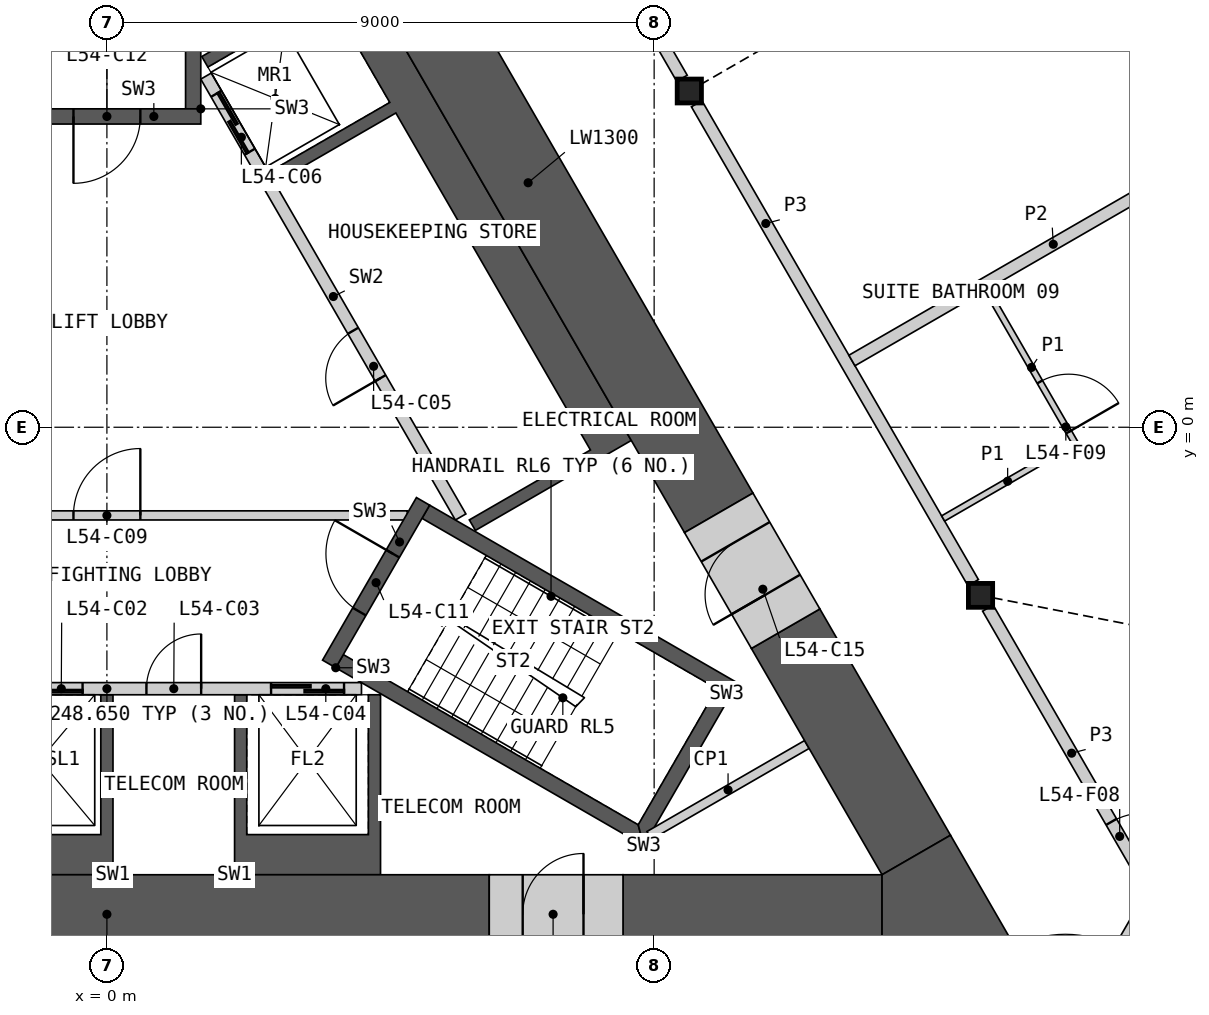
"""IFC4 building model, lengths in metres.
Left out: names, types, materials, properties, quantities, classifications, styles, units other than length and angle.
Written with IfcOpenShell. Run it as: python <this file> out.ifc"""

import sys

from ifc_helpers import new_model, si_unit, direction, frame, frame_2d, origin, origin_2d, place, context, subcontext, project, spatial, polyline, rectangle, i_section, outline, extrude, element, fill, save


model = new_model("IFC4")
c1 = context("Model", 3, precision=1e-05, world=origin(), true_north=direction((0.0, 1.0)))
c2 = subcontext(c1, "Body", "Model", "MODEL_VIEW")
j1 = project(units=[si_unit("LENGTHUNIT", "METRE"), si_unit("PLANEANGLEUNIT", "RADIAN")], contexts=[c1])
p1 = place(None, origin())
s1 = spatial("IfcSite", under=j1, at=p1, CompositionType="ELEMENT")
p2 = place(p1, origin())
s2 = spatial("IfcBuilding", under=s1, at=p2, CompositionType="ELEMENT")
p3 = place(p2, frame((0.0, 0.0, 245.4)))
s3 = spatial("IfcBuildingStorey", under=s2, at=p3, CompositionType="ELEMENT", Elevation=245.4)
for number, where, z_axis, x_axis in (
    (1, (14.368, -2.765, 0.0), (0.0, 0.0, 1.0), (1.0, 0.0, 0.0)),
    (2, (9.578, 5.53, 0.0), (0.0, 0.0, 1.0), (1.0, 0.0, 0.0)),
):
    element("IfcColumn", number, at=place(p3, frame(where, z_axis=z_axis, x_axis=x_axis)), inside=s3, PredefinedType="COLUMN", context=c2, shape_type="SweptSolid", body=[
        extrude(i_section(OverallWidth=0.399, OverallDepth=0.393, WebThickness=0.023, FlangeThickness=0.037, at=origin_2d()), origin(), (0.0, 0.0, 1.0), 3.6),
    ])
p4 = place(p3, origin())
e3 = element("IfcWall", 3, at=p4, inside=s3, PredefinedType="SHEAR", context=c2, shape_type="SweptSolid", body=[
    extrude(outline(polyline([(0.1, -7.36), (-4.5, -7.36), (-4.5, -4.4), (-4.3, -4.4), (-4.3, -6.7), (-2.3, -6.7), (-2.3, -4.4), (-2.1, -4.4), (-2.1, -6.7), (-0.1, -6.7), (-0.1, -4.4), (0.1, -4.4), (0.1, -7.36)])), origin(), (0.0, 0.0, 1.0), 3.25),
])
p5 = place(p3, origin())
e4 = element("IfcWall", 4, at=p5, inside=s3, PredefinedType="SHEAR", context=c2, shape_type="SweptSolid", body=[
    extrude(outline(polyline([(2.1, -7.36), (2.1, -4.4), (2.3, -4.4), (2.3, -6.7), (4.3, -6.7), (4.3, -4.4), (4.5, -4.4), (4.5, -7.36), (2.1, -7.36)])), origin(), (0.0, 0.0, 1.0), 3.25),
])
p6 = place(p3, frame((-4.187, -4.3, 0.0), z_axis=(0.0, 0.0, 1.0), x_axis=(1.0, 0.0, 0.0)))
e5 = element("IfcWall", 5, at=p6, inside=s3, PredefinedType="SOLIDWALL", context=c2, shape_type="SweptSolid", body=[
    extrude(rectangle(XDim=8.373, YDim=0.2, at=frame_2d((4.187, 0.0))), origin(), (0.0, 0.0, 1.0), 3.25),
])
p7 = place(p6, frame((0.287, 0.0, 0.0)))
e6 = element("IfcOpeningElement", 6, at=p7, cuts=e5, PredefinedType="OPENING", context=c2, shape_type="SweptSolid", body=[
    extrude(rectangle(XDim=1.2, YDim=2.1, at=frame_2d((0.6, 1.05))), frame((0.0, 0.11, 0.0), z_axis=(0.0, -1.0, 0.0), x_axis=(1.0, 0.0, 0.0)), (0.0, 0.0, 1.0), 0.22),
])
p8 = place(p6, frame((2.387, 0.0, 0.0)))
e7 = element("IfcOpeningElement", 7, at=p8, cuts=e5, PredefinedType="OPENING", context=c2, shape_type="SweptSolid", body=[
    extrude(rectangle(XDim=1.4, YDim=2.1, at=frame_2d((0.7, 1.05))), frame((0.0, 0.11, 0.0), z_axis=(0.0, -1.0, 0.0), x_axis=(1.0, 0.0, 0.0)), (0.0, 0.0, 1.0), 0.22),
])
p9 = place(p6, frame((4.837, 0.0, 0.0)))
e8 = element("IfcOpeningElement", 8, at=p9, cuts=e5, PredefinedType="OPENING", context=c2, shape_type="SweptSolid", body=[
    extrude(rectangle(XDim=0.9, YDim=2.1, at=frame_2d((0.45, 1.05))), frame((0.0, 0.11, 0.0), z_axis=(0.0, -1.0, 0.0), x_axis=(1.0, 0.0, 0.0)), (0.0, 0.0, 1.0), 0.22),
])
p10 = place(p6, frame((6.887, 0.0, 0.0)))
e9 = element("IfcOpeningElement", 9, at=p10, cuts=e5, PredefinedType="OPENING", context=c2, shape_type="SweptSolid", body=[
    extrude(rectangle(XDim=1.2, YDim=2.1, at=frame_2d((0.6, 1.05))), frame((0.0, 0.11, 0.0), z_axis=(0.0, -1.0, 0.0), x_axis=(1.0, 0.0, 0.0)), (0.0, 0.0, 1.0), 0.22),
])
p11 = place(p3, origin())
e10 = element("IfcWall", 10, at=p11, inside=s3, PredefinedType="SHEAR", context=c2, shape_type="SweptSolid", body=[
    extrude(outline(polyline([(4.124, 7.577), (8.624, -0.217), (8.231, -0.444), (6.061, -1.697), (5.96, -1.524), (7.952, -0.374), (4.752, 5.169), (2.76, 4.019), (2.66, 4.192), (4.652, 5.342), (3.652, 7.074), (1.66, 5.924), (1.561, 6.097), (3.731, 7.35), (4.124, 7.577)])), origin(), (0.0, 0.0, 1.0), 3.25),
])
p12 = place(p3, frame((5.817, -1.476, 0.0), z_axis=(0.0, 0.0, 1.0), x_axis=(-0.500002616675, 0.866023893041, 0.0)))
e11 = element("IfcWall", 11, at=p12, inside=s3, PredefinedType="SOLIDWALL", context=c2, shape_type="SweptSolid", body=[
    extrude(rectangle(XDim=8.373, YDim=0.2, at=frame_2d((4.187, 0.0))), origin(), (0.0, 0.0, 1.0), 3.25),
])
p13 = place(p12, frame((2.637, 0.0, 0.0)))
e12 = element("IfcOpeningElement", 12, at=p13, cuts=e11, PredefinedType="OPENING", context=c2, shape_type="SweptSolid", body=[
    extrude(rectangle(XDim=0.9, YDim=2.1, at=frame_2d((0.45, 1.05))), frame((0.0, 0.11, 0.0), z_axis=(0.0, -1.0, 0.0), x_axis=(1.0, 0.0, 0.0)), (0.0, 0.0, 1.0), 0.22),
])
p14 = place(p12, frame((6.937, 0.0, 0.0)))
e13 = element("IfcOpeningElement", 13, at=p14, cuts=e11, PredefinedType="OPENING", context=c2, shape_type="SweptSolid", body=[
    extrude(rectangle(XDim=1.1, YDim=2.1, at=frame_2d((0.55, 1.05))), frame((0.0, 0.11, 0.0), z_axis=(0.0, -1.0, 0.0), x_axis=(1.0, 0.0, 0.0)), (0.0, 0.0, 1.0), 0.22),
])
p15 = place(p3, frame((-4.941, -1.45, 0.0), z_axis=(0.0, 0.0, 1.0), x_axis=(1.0, 0.0, 0.0)))
e14 = element("IfcWall", 14, at=p15, inside=s3, PredefinedType="PARTITIONING", context=c2, shape_type="SweptSolid", body=[
    extrude(rectangle(XDim=9.882, YDim=0.15, at=frame_2d((4.941, 0.0))), origin(), (0.0, 0.0, 1.0), 3.25),
])
p16 = place(p15, frame((4.391, 0.0, 0.0)))
e15 = element("IfcOpeningElement", 15, at=p16, cuts=e14, PredefinedType="OPENING", context=c2, shape_type="SweptSolid", body=[
    extrude(rectangle(XDim=1.1, YDim=2.1, at=frame_2d((0.55, 1.05))), frame((0.0, 0.085, 0.0), z_axis=(0.0, -1.0, 0.0), x_axis=(1.0, 0.0, 0.0)), (0.0, 0.0, 1.0), 0.17),
])
p17 = place(p3, origin())
e16 = element("IfcWall", 16, at=p17, inside=s3, PredefinedType="SHEAR", context=c2, shape_type="SweptSolid", body=[
    extrude(outline(polyline([(3.763, -3.956), (8.83, -6.881), (8.738, -6.539), (3.888, -3.739), (3.763, -3.956)])), origin(), (0.0, 0.0, 1.0), 3.25),
])
p18 = place(p3, origin())
e17 = element("IfcWall", 17, at=p18, inside=s3, PredefinedType="SHEAR", context=c2, shape_type="SweptSolid", body=[
    extrude(outline(polyline([(8.83, -6.881), (10.374, -4.206), (10.032, -4.298), (8.738, -6.539), (8.83, -6.881)])), origin(), (0.0, 0.0, 1.0), 3.25),
])
p19 = place(p3, origin())
e18 = element("IfcWall", 18, at=p19, inside=s3, PredefinedType="SHEAR", context=c2, shape_type="SweptSolid", body=[
    extrude(outline(polyline([(10.032, -4.298), (10.374, -4.206), (5.307, -1.281), (5.182, -1.498), (10.032, -4.298)])), origin(), (0.0, 0.0, 1.0), 3.25),
])
p20 = place(p3, frame((3.655, -3.893, 0.0), z_axis=(0.0, 0.0, 1.0), x_axis=(0.499982516597, 0.866035497597, 0.0)))
e19 = element("IfcWall", 19, at=p20, inside=s3, PredefinedType="SHEAR", context=c2, shape_type="SweptSolid", body=[
    extrude(rectangle(XDim=3.088, YDim=0.25, at=frame_2d((1.544, 0.0))), origin(), (0.0, 0.0, 1.0), 3.25),
])
p21 = place(p20, frame((0.994, 0.0, 0.0)))
e20 = element("IfcOpeningElement", 20, at=p21, cuts=e19, PredefinedType="OPENING", context=c2, shape_type="SweptSolid", body=[
    extrude(rectangle(XDim=1.1, YDim=2.1, at=frame_2d((0.55, 1.05))), frame((0.0, 0.135, 0.0), z_axis=(0.0, -1.0, 0.0), x_axis=(1.0, 0.0, 0.0)), (0.0, 0.0, 1.0), 0.27),
])
p22 = place(p3, origin())
e21 = element("IfcWall", 21, at=p22, inside=s3, PredefinedType="SHEAR", context=c2, shape_type="SweptSolid", body=[
    extrude(outline(polyline([(1.544, 5.237), (1.544, 11.087), (1.294, 10.837), (1.294, 5.237), (1.544, 5.237)])), origin(), (0.0, 0.0, 1.0), 3.25),
])
p23 = place(p3, frame((1.544, 5.112, 0.0), z_axis=(0.0, 0.0, 1.0), x_axis=(-1.0, 0.0, 0.0)))
e22 = element("IfcWall", 22, at=p23, inside=s3, PredefinedType="SHEAR", context=c2, shape_type="SweptSolid", body=[
    extrude(rectangle(XDim=3.088, YDim=0.25, at=frame_2d((1.544, 0.0))), origin(), (0.0, 0.0, 1.0), 3.25),
])
p24 = place(p23, frame((0.994, 0.0, 0.0)))
e23 = element("IfcOpeningElement", 23, at=p24, cuts=e22, PredefinedType="OPENING", context=c2, shape_type="SweptSolid", body=[
    extrude(rectangle(XDim=1.1, YDim=2.1, at=frame_2d((0.55, 1.05))), frame((0.0, 0.135, 0.0), z_axis=(0.0, -1.0, 0.0), x_axis=(1.0, 0.0, 0.0)), (0.0, 0.0, 1.0), 0.27),
])
p25 = place(p3, frame((11.511, -5.218, 0.0), z_axis=(0.0, 0.0, 1.0), x_axis=(-0.866045649925, -0.499964931016, 0.0)))
e24 = element("IfcWall", 24, at=p25, inside=s3, PredefinedType="PARTITIONING", context=c2, shape_type="SweptSolid", body=[
    extrude(rectangle(XDim=2.992, YDim=0.15, at=frame_2d((1.496, 0.0))), origin(), (0.0, 0.0, 1.0), 3.25),
])
p26 = place(p3, frame((-6.288, -8.01, 0.0), z_axis=(0.0, 0.0, 1.0), x_axis=(1.0, 0.0, 0.0)))
e25 = element("IfcWall", 25, at=p26, inside=s3, PredefinedType="SHEAR", context=c2, shape_type="SweptSolid", body=[
    extrude(rectangle(XDim=12.576, YDim=1.3, at=frame_2d((6.288, 0.0))), origin(), (0.0, 0.0, 1.0), 3.25),
])
p27 = place(p3, frame((8.488, -8.01, 0.0), z_axis=(0.0, 0.0, 1.0), x_axis=(1.0, 0.0, 0.0)))
e26 = element("IfcWall", 26, at=p27, inside=s3, PredefinedType="SHEAR", context=c2, shape_type="SweptSolid", body=[
    extrude(rectangle(XDim=4.26, YDim=1.3, at=frame_2d((2.13, 0.0))), origin(), (0.0, 0.0, 1.0), 3.25),
])
p28 = place(p3, frame((10.062, -1.408, 0.0), z_axis=(0.0, 0.0, 1.0), x_axis=(-0.500000545805, 0.866025088663, 0.0)))
e27 = element("IfcWall", 27, at=p28, inside=s3, PredefinedType="SHEAR", context=c2, shape_type="SweptSolid", body=[
    extrude(rectangle(XDim=12.539, YDim=1.3, at=frame_2d((6.27, 0.0))), origin(), (0.0, 0.0, 1.0), 3.25),
])
p29 = place(p3, frame((13.311, -7.035, 0.0), z_axis=(0.0, 0.0, 1.0), x_axis=(-0.500012574659, 0.86601814368, 0.0)))
e28 = element("IfcWall", 28, at=p29, inside=s3, PredefinedType="SHEAR", context=c2, shape_type="SweptSolid", body=[
    extrude(rectangle(XDim=4.298, YDim=1.3, at=frame_2d((2.149, 0.0))), origin(), (0.0, 0.0, 1.0), 3.25),
])
p30 = place(p3, origin())
e29 = element("IfcWall", 29, at=p30, inside=s3, PredefinedType="SHEAR", context=c2, shape_type="SweptSolid", body=[
    extrude(outline(polyline([(12.748, -8.66), (12.748, -7.36), (13.874, -6.71), (15.0, -8.66), (12.748, -8.66)])), origin(), (0.0, 0.0, 1.0), 3.25),
])
p31 = place(p3, frame((6.288, -8.01, 0.0), z_axis=(0.0, 0.0, 1.0), x_axis=(1.0, 0.0, 0.0)))
e30 = element("IfcWall", 30, at=p31, inside=s3, PredefinedType="SHEAR", context=c2, shape_type="SweptSolid", body=[
    extrude(rectangle(XDim=2.2, YDim=1.3, at=frame_2d((1.1, 0.0))), origin(), (0.0, 0.0, 1.0), 3.25),
])
p32 = place(p31, frame((0.55, 0.0, 0.0)))
e31 = element("IfcOpeningElement", 31, at=p32, cuts=e30, PredefinedType="OPENING", context=c2, shape_type="SweptSolid", body=[
    extrude(rectangle(XDim=1.0, YDim=2.1, at=frame_2d((0.5, 1.05))), frame((0.0, 0.66, 0.0), z_axis=(0.0, -1.0, 0.0), x_axis=(1.0, 0.0, 0.0)), (0.0, 0.0, 1.0), 1.32),
])
p33 = place(p3, frame((11.163, -3.313, 0.0), z_axis=(0.0, 0.0, 1.0), x_axis=(-0.50002983664, 0.866008176907, 0.0)))
e32 = element("IfcWall", 32, at=p33, inside=s3, PredefinedType="SHEAR", context=c2, shape_type="SweptSolid", body=[
    extrude(rectangle(XDim=2.2, YDim=1.3, at=frame_2d((1.1, 0.0))), origin(), (0.0, 0.0, 1.0), 3.25),
])
p34 = place(p33, frame((0.65, 0.0, 0.0)))
e33 = element("IfcOpeningElement", 33, at=p34, cuts=e32, PredefinedType="OPENING", context=c2, shape_type="SweptSolid", body=[
    extrude(rectangle(XDim=1.0, YDim=2.1, at=frame_2d((0.5, 1.05))), frame((0.0, 0.66, 0.0), z_axis=(0.0, -1.0, 0.0), x_axis=(1.0, 0.0, 0.0)), (0.0, 0.0, 1.0), 1.32),
])
p35 = place(p3, frame((9.699, 5.321, 0.0), z_axis=(0.0, 0.0, 1.0), x_axis=(0.49998193945, -0.866035830797, 0.0)))
e34 = element("IfcWall", 34, at=p35, inside=s3, PredefinedType="PARTITIONING", context=c2, shape_type="SweptSolid", body=[
    extrude(rectangle(XDim=9.094, YDim=0.2, at=frame_2d((4.547, 0.0))), origin(), (0.0, 0.0, 1.0), 3.25),
])
p36 = place(p3, frame((4.91, 13.616, 0.0), z_axis=(0.0, 0.0, 1.0), x_axis=(0.50000207303, -0.866024206917, 0.0)))
e35 = element("IfcWall", 35, at=p36, inside=s3, PredefinedType="PARTITIONING", context=c2, shape_type="SweptSolid", body=[
    extrude(rectangle(XDim=9.095, YDim=0.2, at=frame_2d((4.547, 0.0))), origin(), (0.0, 0.0, 1.0), 3.25),
])
p37 = place(p36, frame((5.726, 0.0, 0.0)))
e36 = element("IfcOpeningElement", 36, at=p37, cuts=e35, PredefinedType="OPENING", context=c2, shape_type="SweptSolid", body=[
    extrude(rectangle(XDim=1.8, YDim=2.1, at=frame_2d((0.9, 1.05))), frame((0.0, 0.11, 0.0), z_axis=(0.0, -1.0, 0.0), x_axis=(1.0, 0.0, 0.0)), (0.0, 0.0, 1.0), 0.22),
])
p38 = place(p3, frame((14.489, -2.975, 0.0), z_axis=(0.0, 0.0, 1.0), x_axis=(0.500017753321, -0.866015153657, 0.0)))
e37 = element("IfcWall", 37, at=p38, inside=s3, PredefinedType="PARTITIONING", context=c2, shape_type="SweptSolid", body=[
    extrude(rectangle(XDim=5.51, YDim=0.2, at=frame_2d((2.755, 0.0))), origin(), (0.0, 0.0, 1.0), 3.25),
])
p39 = place(p38, frame((4.06, 0.0, 0.0)))
e38 = element("IfcOpeningElement", 38, at=p39, cuts=e37, PredefinedType="OPENING", context=c2, shape_type="SweptSolid", body=[
    extrude(rectangle(XDim=1.1, YDim=2.1, at=frame_2d((0.55, 1.05))), frame((0.0, 0.11, 0.0), z_axis=(0.0, -1.0, 0.0), x_axis=(1.0, 0.0, 0.0)), (0.0, 0.0, 1.0), 0.22),
])
p40 = place(p3, frame((15.231, -11.06, 0.0), z_axis=(0.0, 0.0, 1.0), x_axis=(0.499961815444, 0.866047448526, 0.0)))
e39 = element("IfcWall", 39, at=p40, inside=s3, PredefinedType="PARTITIONING", context=c2, shape_type="SweptSolid", body=[
    extrude(rectangle(XDim=3.826, YDim=0.2, at=frame_2d((1.913, 0.0))), origin(), (0.0, 0.0, 1.0), 3.25),
])
p41 = place(p40, frame((1.064, 0.0, 0.0)))
e40 = element("IfcOpeningElement", 40, at=p41, cuts=e39, PredefinedType="OPENING", context=c2, shape_type="SweptSolid", body=[
    extrude(rectangle(XDim=1.8, YDim=2.1, at=frame_2d((0.9, 1.05))), frame((0.0, 0.11, 0.0), z_axis=(0.0, -1.0, 0.0), x_axis=(1.0, 0.0, 0.0)), (0.0, 0.0, 1.0), 0.22),
])
p42 = place(p3, frame((12.253, 1.098, 0.0), z_axis=(0.0, 0.0, 1.0), x_axis=(0.866026077102, 0.499998833779, 0.0)))
e41 = element("IfcWall", 41, at=p42, inside=s3, PredefinedType="PARTITIONING", context=c2, shape_type="SweptSolid", body=[
    extrude(rectangle(XDim=7.646, YDim=0.2, at=frame_2d((3.823, 0.0))), origin(), (0.0, 0.0, 1.0), 2.404),
])
p43 = place(p3, frame((14.468, 2.261, 0.0), z_axis=(0.0, 0.0, 1.0), x_axis=(0.500037662692, -0.866003658127, 0.0)))
e42 = element("IfcWall", 42, at=p43, inside=s3, PredefinedType="PARTITIONING", context=c2, shape_type="SweptSolid", body=[
    extrude(rectangle(XDim=2.95, YDim=0.1, at=frame_2d((1.475, 0.0))), origin(), (0.0, 0.0, 1.0), 2.404),
])
p44 = place(p43, frame((1.75, 0.0, 0.0)))
e43 = element("IfcOpeningElement", 43, at=p44, cuts=e42, PredefinedType="OPENING", context=c2, shape_type="SweptSolid", body=[
    extrude(rectangle(XDim=0.95, YDim=2.1, at=frame_2d((0.475, 1.05))), frame((0.0, 0.06, 0.0), z_axis=(0.0, -1.0, 0.0), x_axis=(1.0, 0.0, 0.0)), (0.0, 0.0, 1.0), 0.12),
])
p45 = place(p3, frame((13.753, -1.5, 0.0), z_axis=(0.0, 0.0, 1.0), x_axis=(0.866014668023, 0.500018594424, 0.0)))
e44 = element("IfcWall", 44, at=p45, inside=s3, PredefinedType="PARTITIONING", context=c2, shape_type="SweptSolid", body=[
    extrude(rectangle(XDim=2.45, YDim=0.1, at=frame_2d((1.225, 0.0))), origin(), (0.0, 0.0, 1.0), 2.404),
])
p46 = place(p8, origin())
e45 = element("IfcDoor", 45, at=p46, inside=s3, OperationType="SLIDING_TO_LEFT", PredefinedType="DOOR", context=c2, shape_type="SweptSolid", body=[
    extrude(rectangle(XDim=1.4, YDim=2.1, at=frame_2d((0.7, 1.05))), frame((0.0, 0.025, 0.0), z_axis=(0.0, -1.0, 0.0), x_axis=(1.0, 0.0, 0.0)), (0.0, 0.0, 1.0), 0.05),
])
fill(e7, e45)
p47 = place(p9, origin())
e46 = element("IfcDoor", 46, at=p47, inside=s3, OperationType="SINGLE_SWING_RIGHT", PredefinedType="DOOR", context=c2, shape_type="SweptSolid", body=[
    extrude(rectangle(XDim=0.9, YDim=2.1, at=frame_2d((0.45, 1.05))), frame((0.0, 0.025, 0.0), z_axis=(0.0, -1.0, 0.0), x_axis=(1.0, 0.0, 0.0)), (0.0, 0.0, 1.0), 0.05),
])
fill(e8, e46)
p48 = place(p10, origin())
e47 = element("IfcDoor", 47, at=p48, inside=s3, OperationType="SLIDING_TO_LEFT", PredefinedType="DOOR", context=c2, shape_type="SweptSolid", body=[
    extrude(rectangle(XDim=1.2, YDim=2.1, at=frame_2d((0.6, 1.05))), frame((0.0, 0.025, 0.0), z_axis=(0.0, -1.0, 0.0), x_axis=(1.0, 0.0, 0.0)), (0.0, 0.0, 1.0), 0.05),
])
fill(e9, e47)
p49 = place(p13, origin())
e48 = element("IfcDoor", 48, at=p49, inside=s3, OperationType="SINGLE_SWING_LEFT", PredefinedType="DOOR", context=c2, shape_type="SweptSolid", body=[
    extrude(rectangle(XDim=0.9, YDim=2.1, at=frame_2d((0.45, 1.05))), frame((0.0, 0.025, 0.0), z_axis=(0.0, -1.0, 0.0), x_axis=(1.0, 0.0, 0.0)), (0.0, 0.0, 1.0), 0.05),
])
fill(e12, e48)
p50 = place(p14, origin())
e49 = element("IfcDoor", 49, at=p50, inside=s3, OperationType="SLIDING_TO_LEFT", PredefinedType="DOOR", context=c2, shape_type="SweptSolid", body=[
    extrude(rectangle(XDim=1.1, YDim=2.1, at=frame_2d((0.55, 1.05))), frame((0.0, 0.025, 0.0), z_axis=(0.0, -1.0, 0.0), x_axis=(1.0, 0.0, 0.0)), (0.0, 0.0, 1.0), 0.05),
])
fill(e13, e49)
p51 = place(p16, origin())
e50 = element("IfcDoor", 50, at=p51, inside=s3, OperationType="SINGLE_SWING_RIGHT", PredefinedType="DOOR", context=c2, shape_type="SweptSolid", body=[
    extrude(rectangle(XDim=1.1, YDim=2.1, at=frame_2d((0.55, 1.05))), frame((0.0, 0.025, 0.0), z_axis=(0.0, -1.0, 0.0), x_axis=(1.0, 0.0, 0.0)), (0.0, 0.0, 1.0), 0.05),
])
fill(e15, e50)
p52 = place(p21, origin())
e51 = element("IfcDoor", 51, at=p52, inside=s3, OperationType="SINGLE_SWING_RIGHT", PredefinedType="DOOR", context=c2, shape_type="SweptSolid", body=[
    extrude(rectangle(XDim=1.1, YDim=2.1, at=frame_2d((0.55, 1.05))), frame((0.0, 0.025, 0.0), z_axis=(0.0, -1.0, 0.0), x_axis=(1.0, 0.0, 0.0)), (0.0, 0.0, 1.0), 0.05),
])
fill(e20, e51)
p53 = place(p24, origin())
e52 = element("IfcDoor", 52, at=p53, inside=s3, OperationType="SINGLE_SWING_RIGHT", PredefinedType="DOOR", context=c2, shape_type="SweptSolid", body=[
    extrude(rectangle(XDim=1.1, YDim=2.1, at=frame_2d((0.55, 1.05))), frame((0.0, 0.025, 0.0), z_axis=(0.0, -1.0, 0.0), x_axis=(1.0, 0.0, 0.0)), (0.0, 0.0, 1.0), 0.05),
])
fill(e23, e52)
p54 = place(p32, origin())
e53 = element("IfcDoor", 53, at=p54, inside=s3, OperationType="SINGLE_SWING_RIGHT", PredefinedType="DOOR", context=c2, shape_type="SweptSolid", body=[
    extrude(rectangle(XDim=1.0, YDim=2.1, at=frame_2d((0.5, 1.05))), frame((0.0, 0.405, 0.0), z_axis=(0.0, -1.0, 0.0), x_axis=(1.0, 0.0, 0.0)), (0.0, 0.0, 1.0), 0.05),
])
fill(e31, e53)
p55 = place(p34, origin())
e54 = element("IfcDoor", 54, at=p55, inside=s3, OperationType="SINGLE_SWING_LEFT", PredefinedType="DOOR", context=c2, shape_type="SweptSolid", body=[
    extrude(rectangle(XDim=1.0, YDim=2.1, at=frame_2d((0.5, 1.05))), frame((0.0, 0.405, 0.0), z_axis=(0.0, -1.0, 0.0), x_axis=(1.0, 0.0, 0.0)), (0.0, 0.0, 1.0), 0.05),
])
fill(e33, e54)
p56 = place(p39, origin())
e55 = element("IfcDoor", 55, at=p56, inside=s3, OperationType="SINGLE_SWING_RIGHT", PredefinedType="DOOR", context=c2, shape_type="SweptSolid", body=[
    extrude(rectangle(XDim=1.1, YDim=2.1, at=frame_2d((0.55, 1.05))), frame((0.0, 0.025, 0.0), z_axis=(0.0, -1.0, 0.0), x_axis=(1.0, 0.0, 0.0)), (0.0, 0.0, 1.0), 0.05),
])
fill(e38, e55)
p57 = place(p44, origin())
e56 = element("IfcDoor", 56, at=p57, inside=s3, OperationType="SINGLE_SWING_RIGHT", PredefinedType="DOOR", context=c2, shape_type="SweptSolid", body=[
    extrude(rectangle(XDim=0.95, YDim=2.1, at=frame_2d((0.475, 1.05))), frame((0.0, 0.025, 0.0), z_axis=(0.0, -1.0, 0.0), x_axis=(1.0, 0.0, 0.0)), (0.0, 0.0, 1.0), 0.05),
])
fill(e43, e56)
save(model, sys.argv[1])
